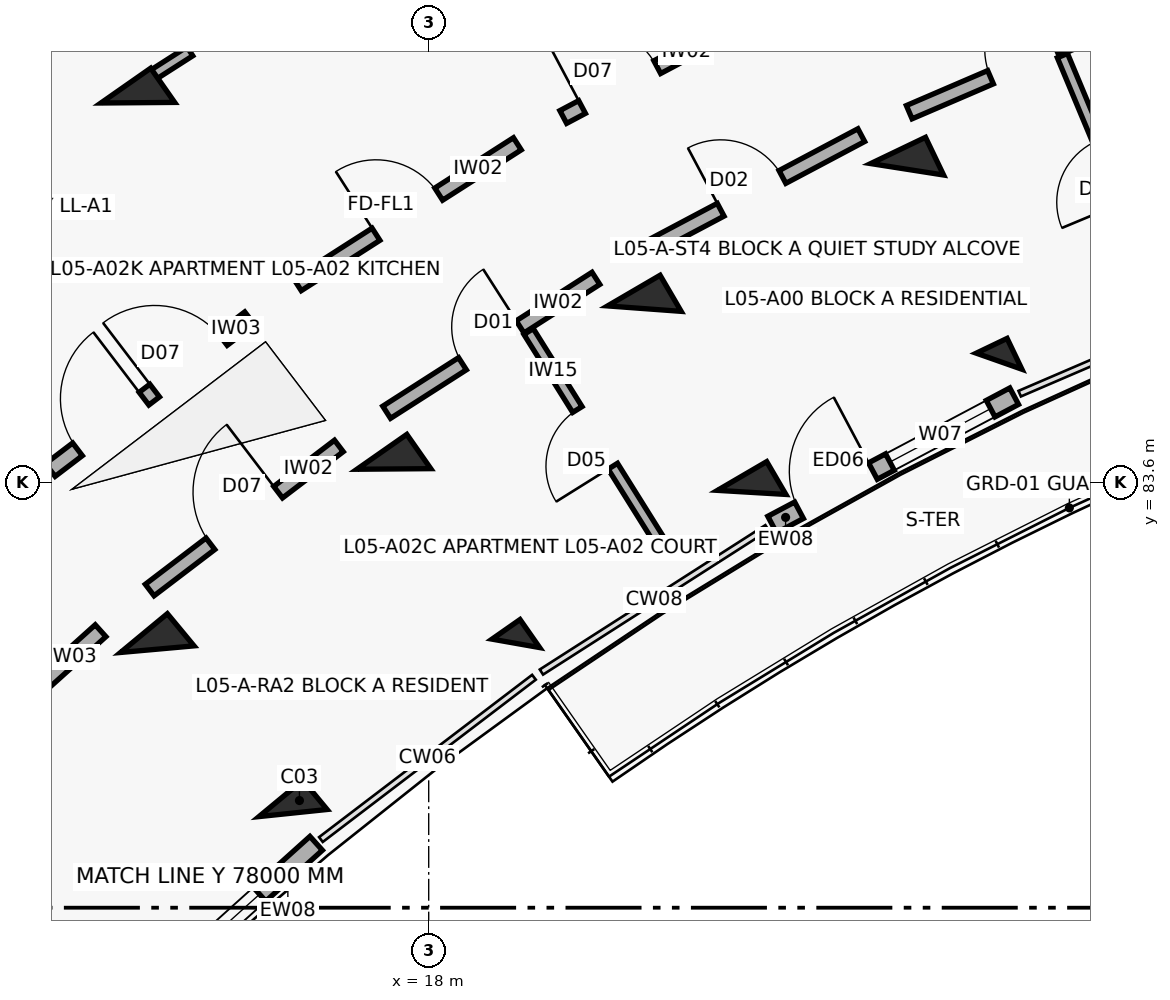
"""IFC4 building model, lengths in metres.
Left out: names, types, materials, properties, quantities, classifications, styles, units other than length and angle.
Written with IfcOpenShell. Run it as: python <this file> out.ifc"""

import sys

from ifc_helpers import new_model, si_unit, direction, frame, frame_2d, origin, origin_2d, place, context, subcontext, project, spatial, rectangle, extrude, element, fill, save


model = new_model("IFC4")
c1 = context("Model", 3, precision=1e-05, world=origin(), true_north=direction((0.0, 1.0)))
c2 = subcontext(c1, "Body", "Model", "MODEL_VIEW")
j1 = project(units=[si_unit("LENGTHUNIT", "METRE"), si_unit("PLANEANGLEUNIT", "RADIAN")], contexts=[c1])
p1 = place(None, origin())
s1 = spatial("IfcSite", under=j1, at=p1, CompositionType="ELEMENT")
p2 = place(p1, origin())
s2 = spatial("IfcBuilding", under=s1, at=p2, CompositionType="ELEMENT")
p3 = place(p2, frame((0.0, 0.0, 17.4)))
s3 = spatial("IfcBuildingStorey", under=s2, at=p3, CompositionType="ELEMENT", Elevation=17.4)
p4 = place(p3, frame((16.215, 79.245, 0.0), z_axis=(0.0, 0.0, 1.0), x_axis=(-0.637961754089, 0.770068049148, 0.0)))
e1 = element("IfcColumn", 1, at=p4, inside=s3, PredefinedType="COLUMN", context=c2, shape_type="SweptSolid", body=[
    extrude(rectangle(XDim=0.5, YDim=0.75, at=origin_2d()), origin(), (0.0, 0.0, 1.0), 3.1),
])
p5 = place(p3, frame((14.429, 81.402, 0.0), z_axis=(0.0, 0.0, 1.0), x_axis=(-0.637961754089, 0.770068049148, 0.0)))
e2 = element("IfcColumn", 2, at=p5, inside=s3, PredefinedType="COLUMN", context=c2, shape_type="SweptSolid", body=[
    extrude(rectangle(XDim=0.55, YDim=0.8, at=origin_2d()), origin(), (0.0, 0.0, 1.0), 3.1),
])
p6 = place(p3, frame((19.146, 81.478, 0.0), z_axis=(0.0, 0.0, 1.0), x_axis=(-0.573004420611, 0.819552276527, 0.0)))
e3 = element("IfcColumn", 3, at=p6, inside=s3, PredefinedType="COLUMN", context=c2, shape_type="SweptSolid", body=[
    extrude(rectangle(XDim=0.45, YDim=0.45, at=origin_2d()), origin(), (0.0, 0.0, 1.0), 3.1),
])
for number, where, z_axis, x_axis in (
    (4, (17.542, 83.773, 0.0), (0.0, 0.0, 1.0), (-0.573, 0.82, 0.0)),
    (5, (14.172, 88.592, 0.0), (0.0, 0.0, 1.0), (-0.573, 0.82, 0.0)),
):
    element("IfcColumn", number, at=place(p3, frame(where, z_axis=z_axis, x_axis=x_axis)), inside=s3, PredefinedType="COLUMN", context=c2, shape_type="SweptSolid", body=[
        extrude(rectangle(XDim=0.55, YDim=0.8, at=origin_2d()), origin(), (0.0, 0.0, 1.0), 3.1),
    ])
p7 = place(p3, frame((22.249, 83.464, 0.0), z_axis=(0.0, 0.0, 1.0), x_axis=(-0.504226211181, 0.863571611366, 0.0)))
e6 = element("IfcColumn", 6, at=p7, inside=s3, PredefinedType="COLUMN", context=c2, shape_type="SweptSolid", body=[
    extrude(rectangle(XDim=0.5, YDim=0.75, at=origin_2d()), origin(), (0.0, 0.0, 1.0), 3.1),
])
p8 = place(p3, frame((20.837, 85.882, 0.0), z_axis=(0.0, 0.0, 1.0), x_axis=(-0.504226211181, 0.863571611366, 0.0)))
e7 = element("IfcColumn", 7, at=p8, inside=s3, PredefinedType="COLUMN", context=c2, shape_type="SweptSolid", body=[
    extrude(rectangle(XDim=0.55, YDim=0.8, at=origin_2d()), origin(), (0.0, 0.0, 1.0), 3.1),
])
p9 = place(p3, frame((25.504, 85.191, 0.0), z_axis=(0.0, 0.0, 1.0), x_axis=(-0.432085748802, 0.901832526405, 0.0)))
e8 = element("IfcColumn", 8, at=p9, inside=s3, PredefinedType="COLUMN", context=c2, shape_type="SweptSolid", body=[
    extrude(rectangle(XDim=0.45, YDim=0.45, at=origin_2d()), origin(), (0.0, 0.0, 1.0), 3.1),
])
p10 = place(p3, frame((24.294, 87.716, 0.0), z_axis=(0.0, 0.0, 1.0), x_axis=(-0.432085748802, 0.901832526405, 0.0)))
e9 = element("IfcColumn", 9, at=p10, inside=s3, PredefinedType="COLUMN", context=c2, shape_type="SweptSolid", body=[
    extrude(rectangle(XDim=0.55, YDim=0.8, at=origin_2d()), origin(), (0.0, 0.0, 1.0), 3.1),
])
p11 = place(p3, frame((13.84, 76.437, 0.0), z_axis=(0.0, 0.0, 1.0), x_axis=(0.743385092197, 0.668863666751, 0.0)))
e10 = element("IfcWall", 10, at=p11, inside=s3, PredefinedType="SOLIDWALL", context=c2, shape_type="SweptSolid", body=[
    extrude(rectangle(XDim=3.604, YDim=0.245, at=frame_2d((1.802, 0.0))), origin(), (0.0, 0.0, 1.0), 2.25),
])
p12 = place(p11, frame((1.002, 0.0, 0.32)))
e11 = element("IfcOpeningElement", 11, at=p12, cuts=e10, PredefinedType="OPENING", context=c2, shape_type="SweptSolid", body=[
    extrude(rectangle(XDim=1.6, YDim=1.5, at=frame_2d((0.8, 0.75))), frame((0.0, 0.133, 0.0), z_axis=(0.0, -1.0, 0.0), x_axis=(1.0, 0.0, 0.0)), (0.0, 0.0, 1.0), 0.265),
])
p13 = place(p3, frame((22.519, 83.042, 0.0), z_axis=(0.0, 0.0, 1.0), x_axis=(0.883438308286, 0.468547495407, 0.0)))
e12 = element("IfcWall", 12, at=p13, inside=s3, PredefinedType="SOLIDWALL", context=c2, shape_type="SweptSolid", body=[
    extrude(rectangle(XDim=3.604, YDim=0.245, at=frame_2d((1.802, 0.0))), origin(), (0.0, 0.0, 1.0), 2.25),
])
p14 = place(p13, frame((0.4, 0.0, 0.0)))
e13 = element("IfcOpeningElement", 13, at=p14, cuts=e12, PredefinedType="OPENING", context=c2, shape_type="SweptSolid", body=[
    extrude(rectangle(XDim=1.1, YDim=2.15, at=frame_2d((0.55, 1.075))), frame((0.0, 0.133, 0.0), z_axis=(0.0, -1.0, 0.0), x_axis=(1.0, 0.0, 0.0)), (0.0, 0.0, 1.0), 0.265),
])
p15 = place(p13, frame((1.754, 0.0, 0.35)))
e14 = element("IfcOpeningElement", 14, at=p15, cuts=e12, PredefinedType="OPENING", context=c2, shape_type="SweptSolid", body=[
    extrude(rectangle(XDim=1.5, YDim=1.65, at=frame_2d((0.75, 0.825))), frame((0.0, 0.133, 0.0), z_axis=(0.0, -1.0, 0.0), x_axis=(1.0, 0.0, 0.0)), (0.0, 0.0, 1.0), 0.265),
])
p16 = place(p3, frame((11.357, 79.552, 0.0), z_axis=(0.0, 0.0, 1.0), x_axis=(0.743387266925, 0.668861249718, 0.0)))
e15 = element("IfcWall", 15, at=p16, inside=s3, PredefinedType="SOLIDWALL", context=c2, shape_type="SweptSolid", body=[
    extrude(rectangle(XDim=3.128, YDim=0.21, at=frame_2d((1.564, 0.0))), origin(), (0.0, 0.0, 1.0), 2.08),
])
p17 = place(p16, frame((1.014, 0.0, 0.0)))
e16 = element("IfcOpeningElement", 16, at=p17, cuts=e15, PredefinedType="OPENING", context=c2, shape_type="SweptSolid", body=[
    extrude(rectangle(XDim=1.1, YDim=2.15, at=frame_2d((0.55, 1.075))), frame((0.0, 0.115, 0.0), z_axis=(0.0, -1.0, 0.0), x_axis=(1.0, 0.0, 0.0)), (0.0, 0.0, 1.0), 0.23),
])
p18 = place(p3, frame((13.021, 83.759, 0.0), z_axis=(0.0, 0.0, 1.0), x_axis=(0.795498026433, 0.605956178235, 0.0)))
e17 = element("IfcWall", 17, at=p18, inside=s3, PredefinedType="SOLIDWALL", context=c2, shape_type="SweptSolid", body=[
    extrude(rectangle(XDim=3.296, YDim=0.21, at=frame_2d((1.648, 0.0))), origin(), (0.0, 0.0, 1.0), 2.08),
])
p19 = place(p18, frame((0.45, 0.0, 0.0)))
e18 = element("IfcOpeningElement", 18, at=p19, cuts=e17, PredefinedType="OPENING", context=c2, shape_type="SweptSolid", body=[
    extrude(rectangle(XDim=1.1, YDim=2.15, at=frame_2d((0.55, 1.075))), frame((0.0, 0.115, 0.0), z_axis=(0.0, -1.0, 0.0), x_axis=(1.0, 0.0, 0.0)), (0.0, 0.0, 1.0), 0.23),
])
p20 = place(p18, frame((1.726, 0.0, 0.0)))
e19 = element("IfcOpeningElement", 19, at=p20, cuts=e17, PredefinedType="OPENING", context=c2, shape_type="SweptSolid", body=[
    extrude(rectangle(XDim=1.12, YDim=2.15, at=frame_2d((0.56, 1.075))), frame((0.0, 0.115, 0.0), z_axis=(0.0, -1.0, 0.0), x_axis=(1.0, 0.0, 0.0)), (0.0, 0.0, 1.0), 0.23),
])
p21 = place(p3, frame((14.329, 82.18, 0.0), z_axis=(0.0, 0.0, 1.0), x_axis=(0.795501577908, 0.605951515838, 0.0)))
e20 = element("IfcWall", 20, at=p21, inside=s3, PredefinedType="SOLIDWALL", context=c2, shape_type="SweptSolid", body=[
    extrude(rectangle(XDim=3.129, YDim=0.19, at=frame_2d((1.564, 0.0))), origin(), (0.0, 0.0, 1.0), 2.08),
])
p22 = place(p21, frame((1.004, 0.0, 0.0)))
e21 = element("IfcOpeningElement", 21, at=p22, cuts=e20, PredefinedType="OPENING", context=c2, shape_type="SweptSolid", body=[
    extrude(rectangle(XDim=1.12, YDim=2.15, at=frame_2d((0.56, 1.075))), frame((0.0, 0.105, 0.0), z_axis=(0.0, -1.0, 0.0), x_axis=(1.0, 0.0, 0.0)), (0.0, 0.0, 1.0), 0.21),
])
p23 = place(p3, frame((16.272, 86.199, 0.0), z_axis=(0.0, 0.0, 1.0), x_axis=(0.842257205985, 0.539075874963, 0.0)))
e22 = element("IfcWall", 22, at=p23, inside=s3, PredefinedType="SOLIDWALL", context=c2, shape_type="SweptSolid", body=[
    extrude(rectangle(XDim=3.436, YDim=0.19, at=frame_2d((1.718, 0.0))), origin(), (0.0, 0.0, 1.0), 2.08),
])
p24 = place(p23, frame((1.228, 0.0, 0.0)))
e23 = element("IfcOpeningElement", 23, at=p24, cuts=e22, PredefinedType="OPENING", context=c2, shape_type="SweptSolid", body=[
    extrude(rectangle(XDim=0.98, YDim=2.15, at=frame_2d((0.49, 1.075))), frame((0.0, 0.105, 0.0), z_axis=(0.0, -1.0, 0.0), x_axis=(1.0, 0.0, 0.0)), (0.0, 0.0, 1.0), 0.21),
])
p25 = place(p3, frame((17.447, 84.519, 0.0), z_axis=(0.0, 0.0, 1.0), x_axis=(0.842225276846, 0.539125758095, 0.0)))
e24 = element("IfcWall", 24, at=p25, inside=s3, PredefinedType="SOLIDWALL", context=c2, shape_type="SweptSolid", body=[
    extrude(rectangle(XDim=3.269, YDim=0.19, at=frame_2d((1.634, 0.0))), origin(), (0.0, 0.0, 1.0), 2.08),
])
p26 = place(p25, frame((1.184, 0.0, 0.0)))
e25 = element("IfcOpeningElement", 25, at=p26, cuts=e24, PredefinedType="OPENING", context=c2, shape_type="SweptSolid", body=[
    extrude(rectangle(XDim=0.9, YDim=2.1, at=frame_2d((0.45, 1.05))), frame((0.0, 0.105, 0.0), z_axis=(0.0, -1.0, 0.0), x_axis=(1.0, 0.0, 0.0)), (0.0, 0.0, 1.0), 0.21),
])
p27 = place(p3, frame((21.064, 82.783, 0.0), z_axis=(0.0, 0.0, 1.0), x_axis=(-0.53015188203, 0.847902696057, 0.0)))
e26 = element("IfcWall", 26, at=p27, inside=s3, PredefinedType="PARTITIONING", context=c2, shape_type="SweptSolid", body=[
    extrude(rectangle(XDim=3.3, YDim=0.145, at=frame_2d((1.65, 0.0))), origin(), (0.0, 0.0, 1.0), 2.08),
])
p28 = place(p27, frame((1.21, 0.0, 0.0)))
e27 = element("IfcOpeningElement", 27, at=p28, cuts=e26, PredefinedType="OPENING", context=c2, shape_type="SweptSolid", body=[
    extrude(rectangle(XDim=0.88, YDim=2.1, at=frame_2d((0.44, 1.05))), frame((0.0, 0.083, 0.0), z_axis=(0.0, -1.0, 0.0), x_axis=(1.0, 0.0, 0.0)), (0.0, 0.0, 1.0), 0.165),
])
p29 = place(p3, frame((14.311, 88.917, 0.0), z_axis=(0.0, 0.0, 1.0), x_axis=(0.842238809758, 0.53910461632, 0.0)))
e28 = element("IfcWall", 28, at=p29, inside=s3, PredefinedType="PARTITIONING", context=c2, shape_type="SweptSolid", body=[
    extrude(rectangle(XDim=3.81, YDim=0.14, at=frame_2d((1.905, 0.0))), origin(), (0.0, 0.0, 1.0), 2.08),
])
p30 = place(p29, frame((0.65, 0.0, 0.0)))
e29 = element("IfcOpeningElement", 29, at=p30, cuts=e28, PredefinedType="OPENING", context=c2, shape_type="SweptSolid", body=[
    extrude(rectangle(XDim=0.9, YDim=2.1, at=frame_2d((0.45, 1.05))), frame((0.0, 0.08, 0.0), z_axis=(0.0, -1.0, 0.0), x_axis=(1.0, 0.0, 0.0)), (0.0, 0.0, 1.0), 0.16),
])
p31 = place(p29, frame((2.28, 0.0, 0.0)))
e30 = element("IfcOpeningElement", 30, at=p31, cuts=e28, PredefinedType="OPENING", context=c2, shape_type="SweptSolid", body=[
    extrude(rectangle(XDim=0.88, YDim=2.1, at=frame_2d((0.44, 1.05))), frame((0.0, 0.08, 0.0), z_axis=(0.0, -1.0, 0.0), x_axis=(1.0, 0.0, 0.0)), (0.0, 0.0, 1.0), 0.16),
])
p32 = place(p3, frame((19.77, 88.404, 0.0), z_axis=(0.0, 0.0, 1.0), x_axis=(0.883410853063, 0.468599258099, 0.0)))
e31 = element("IfcWall", 31, at=p32, inside=s3, PredefinedType="SOLIDWALL", context=c2, shape_type="SweptSolid", body=[
    extrude(rectangle(XDim=3.436, YDim=0.19, at=frame_2d((1.718, 0.0))), origin(), (0.0, 0.0, 1.0), 2.08),
])
p33 = place(p32, frame((0.28, 0.0, 0.0)))
e32 = element("IfcOpeningElement", 32, at=p33, cuts=e31, PredefinedType="OPENING", context=c2, shape_type="SweptSolid", body=[
    extrude(rectangle(XDim=1.12, YDim=2.15, at=frame_2d((0.56, 1.075))), frame((0.0, 0.105, 0.0), z_axis=(0.0, -1.0, 0.0), x_axis=(1.0, 0.0, 0.0)), (0.0, 0.0, 1.0), 0.21),
])
p34 = place(p32, frame((2.266, 0.0, 0.0)))
e33 = element("IfcOpeningElement", 33, at=p34, cuts=e31, PredefinedType="OPENING", context=c2, shape_type="SweptSolid", body=[
    extrude(rectangle(XDim=0.95, YDim=2.1, at=frame_2d((0.475, 1.05))), frame((0.0, 0.105, 0.0), z_axis=(0.0, -1.0, 0.0), x_axis=(1.0, 0.0, 0.0)), (0.0, 0.0, 1.0), 0.21),
])
p35 = place(p3, frame((20.804, 86.634, 0.0), z_axis=(0.0, 0.0, 1.0), x_axis=(0.883444301944, 0.468536194293, 0.0)))
e34 = element("IfcWall", 34, at=p35, inside=s3, PredefinedType="SOLIDWALL", context=c2, shape_type="SweptSolid", body=[
    extrude(rectangle(XDim=3.269, YDim=0.19, at=frame_2d((1.634, 0.0))), origin(), (0.0, 0.0, 1.0), 2.08),
])
p36 = place(p35, frame((1.174, 0.0, 0.0)))
e35 = element("IfcOpeningElement", 35, at=p36, cuts=e34, PredefinedType="OPENING", context=c2, shape_type="SweptSolid", body=[
    extrude(rectangle(XDim=0.92, YDim=2.1, at=frame_2d((0.46, 1.05))), frame((0.0, 0.105, 0.0), z_axis=(0.0, -1.0, 0.0), x_axis=(1.0, 0.0, 0.0)), (0.0, 0.0, 1.0), 0.21),
])
p37 = place(p3, frame((24.322, 88.467, 0.0), z_axis=(0.0, 0.0, 1.0), x_axis=(0.918723391052, 0.394901672235, 0.0)))
e36 = element("IfcWall", 36, at=p37, inside=s3, PredefinedType="SOLIDWALL", context=c2, shape_type="SweptSolid", body=[
    extrude(rectangle(XDim=3.269, YDim=0.19, at=frame_2d((1.634, 0.0))), origin(), (0.0, 0.0, 1.0), 2.08),
])
p38 = place(p37, frame((1.164, 0.0, 0.0)))
e37 = element("IfcOpeningElement", 37, at=p38, cuts=e36, PredefinedType="OPENING", context=c2, shape_type="SweptSolid", body=[
    extrude(rectangle(XDim=0.94, YDim=2.1, at=frame_2d((0.47, 1.05))), frame((0.0, 0.105, 0.0), z_axis=(0.0, -1.0, 0.0), x_axis=(1.0, 0.0, 0.0)), (0.0, 0.0, 1.0), 0.21),
])
p39 = place(p3, frame((27.609, 86.166, 0.0), z_axis=(0.0, 0.0, 1.0), x_axis=(-0.385151143297, 0.922853507777, 0.0)))
e38 = element("IfcWall", 38, at=p39, inside=s3, PredefinedType="PARTITIONING", context=c2, shape_type="SweptSolid", body=[
    extrude(rectangle(XDim=3.3, YDim=0.145, at=frame_2d((1.65, 0.0))), origin(), (0.0, 0.0, 1.0), 2.08),
])
p40 = place(p39, frame((1.21, 0.0, 0.0)))
e39 = element("IfcOpeningElement", 39, at=p40, cuts=e38, PredefinedType="OPENING", context=c2, shape_type="SweptSolid", body=[
    extrude(rectangle(XDim=0.88, YDim=2.1, at=frame_2d((0.44, 1.05))), frame((0.0, 0.083, 0.0), z_axis=(0.0, -1.0, 0.0), x_axis=(1.0, 0.0, 0.0)), (0.0, 0.0, 1.0), 0.165),
])
p41 = place(p12, origin())
e40 = element("IfcWindow", 40, at=p41, inside=s3, PartitioningType="DOUBLE_PANEL_VERTICAL", PredefinedType="WINDOW", context=c2, shape_type="SweptSolid", body=[
    extrude(rectangle(XDim=1.6, YDim=1.5, at=frame_2d((0.8, 0.75))), frame((0.0, 0.03, 0.0), z_axis=(0.0, -1.0, 0.0), x_axis=(1.0, 0.0, 0.0)), (0.0, 0.0, 1.0), 0.06),
])
fill(e11, e40)
p42 = place(p14, origin())
e41 = element("IfcDoor", 41, at=p42, inside=s3, OperationType="SINGLE_SWING_RIGHT", PredefinedType="DOOR", context=c2, shape_type="SweptSolid", body=[
    extrude(rectangle(XDim=1.1, YDim=2.15, at=frame_2d((0.55, 1.075))), frame((0.0, 0.025, 0.0), z_axis=(0.0, -1.0, 0.0), x_axis=(1.0, 0.0, 0.0)), (0.0, 0.0, 1.0), 0.05),
])
fill(e13, e41)
p43 = place(p15, origin())
e42 = element("IfcWindow", 42, at=p43, inside=s3, PartitioningType="DOUBLE_PANEL_VERTICAL", PredefinedType="WINDOW", context=c2, shape_type="SweptSolid", body=[
    extrude(rectangle(XDim=1.5, YDim=1.65, at=frame_2d((0.75, 0.825))), frame((0.0, 0.03, 0.0), z_axis=(0.0, -1.0, 0.0), x_axis=(1.0, 0.0, 0.0)), (0.0, 0.0, 1.0), 0.06),
])
fill(e14, e42)
p44 = place(p19, origin())
e43 = element("IfcDoor", 43, at=p44, inside=s3, OperationType="SINGLE_SWING_RIGHT", PredefinedType="DOOR", context=c2, shape_type="SweptSolid", body=[
    extrude(rectangle(XDim=1.1, YDim=2.15, at=frame_2d((0.55, 1.075))), frame((0.0, 0.025, 0.0), z_axis=(0.0, -1.0, 0.0), x_axis=(1.0, 0.0, 0.0)), (0.0, 0.0, 1.0), 0.05),
])
fill(e18, e43)
p45 = place(p20, origin())
e44 = element("IfcDoor", 44, at=p45, inside=s3, OperationType="SINGLE_SWING_LEFT", PredefinedType="DOOR", context=c2, shape_type="SweptSolid", body=[
    extrude(rectangle(XDim=1.12, YDim=2.15, at=frame_2d((0.56, 1.075))), frame((0.0, 0.025, 0.0), z_axis=(0.0, -1.0, 0.0), x_axis=(1.0, 0.0, 0.0)), (0.0, 0.0, 1.0), 0.05),
])
fill(e19, e44)
p46 = place(p22, origin())
e45 = element("IfcDoor", 45, at=p46, inside=s3, OperationType="SINGLE_SWING_RIGHT", PredefinedType="DOOR", context=c2, shape_type="SweptSolid", body=[
    extrude(rectangle(XDim=1.12, YDim=2.15, at=frame_2d((0.56, 1.075))), frame((0.0, 0.025, 0.0), z_axis=(0.0, -1.0, 0.0), x_axis=(1.0, 0.0, 0.0)), (0.0, 0.0, 1.0), 0.05),
])
fill(e21, e45)
p47 = place(p24, origin())
e46 = element("IfcDoor", 46, at=p47, inside=s3, OperationType="SINGLE_SWING_LEFT", PredefinedType="DOOR", context=c2, shape_type="SweptSolid", body=[
    extrude(rectangle(XDim=0.98, YDim=2.15, at=frame_2d((0.49, 1.075))), frame((0.0, 0.025, 0.0), z_axis=(0.0, -1.0, 0.0), x_axis=(1.0, 0.0, 0.0)), (0.0, 0.0, 1.0), 0.05),
])
fill(e23, e46)
p48 = place(p26, origin())
e47 = element("IfcDoor", 47, at=p48, inside=s3, OperationType="SINGLE_SWING_RIGHT", PredefinedType="DOOR", context=c2, shape_type="SweptSolid", body=[
    extrude(rectangle(XDim=0.9, YDim=2.1, at=frame_2d((0.45, 1.05))), frame((0.0, 0.025, 0.0), z_axis=(0.0, -1.0, 0.0), x_axis=(1.0, 0.0, 0.0)), (0.0, 0.0, 1.0), 0.05),
])
fill(e25, e47)
p49 = place(p28, origin())
e48 = element("IfcDoor", 48, at=p49, inside=s3, OperationType="SINGLE_SWING_LEFT", PredefinedType="DOOR", context=c2, shape_type="SweptSolid", body=[
    extrude(rectangle(XDim=0.88, YDim=2.1, at=frame_2d((0.44, 1.05))), frame((0.0, 0.025, 0.0), z_axis=(0.0, -1.0, 0.0), x_axis=(1.0, 0.0, 0.0)), (0.0, 0.0, 1.0), 0.05),
])
fill(e27, e48)
p50 = place(p30, origin())
e49 = element("IfcDoor", 49, at=p50, inside=s3, OperationType="SINGLE_SWING_RIGHT", PredefinedType="DOOR", context=c2, shape_type="SweptSolid", body=[
    extrude(rectangle(XDim=0.9, YDim=2.1, at=frame_2d((0.45, 1.05))), frame((0.0, 0.025, 0.0), z_axis=(0.0, -1.0, 0.0), x_axis=(1.0, 0.0, 0.0)), (0.0, 0.0, 1.0), 0.05),
])
fill(e29, e49)
p51 = place(p33, origin())
e50 = element("IfcDoor", 50, at=p51, inside=s3, OperationType="SINGLE_SWING_LEFT", PredefinedType="DOOR", context=c2, shape_type="SweptSolid", body=[
    extrude(rectangle(XDim=1.12, YDim=2.15, at=frame_2d((0.56, 1.075))), frame((0.0, 0.025, 0.0), z_axis=(0.0, -1.0, 0.0), x_axis=(1.0, 0.0, 0.0)), (0.0, 0.0, 1.0), 0.05),
])
fill(e32, e50)
p52 = place(p36, origin())
e51 = element("IfcDoor", 51, at=p52, inside=s3, OperationType="SINGLE_SWING_LEFT", PredefinedType="DOOR", context=c2, shape_type="SweptSolid", body=[
    extrude(rectangle(XDim=0.92, YDim=2.1, at=frame_2d((0.46, 1.05))), frame((0.0, 0.025, 0.0), z_axis=(0.0, -1.0, 0.0), x_axis=(1.0, 0.0, 0.0)), (0.0, 0.0, 1.0), 0.05),
])
fill(e35, e51)
p53 = place(p38, origin())
e52 = element("IfcDoor", 52, at=p53, inside=s3, OperationType="SINGLE_SWING_RIGHT", PredefinedType="DOOR", context=c2, shape_type="SweptSolid", body=[
    extrude(rectangle(XDim=0.94, YDim=2.1, at=frame_2d((0.47, 1.05))), frame((0.0, 0.025, 0.0), z_axis=(0.0, -1.0, 0.0), x_axis=(1.0, 0.0, 0.0)), (0.0, 0.0, 1.0), 0.05),
])
fill(e37, e52)
save(model, sys.argv[1])
